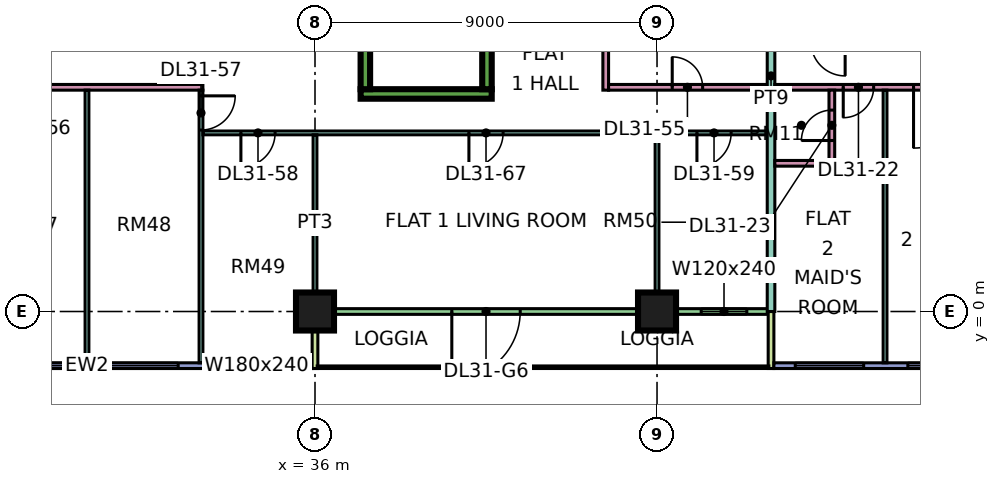
"""IFC4 building model, lengths in metres.
Left out: names, types, materials, properties, quantities, classifications, styles, units other than length and angle.
Written with IfcOpenShell. Run it as: python <this file> out.ifc"""

import sys

from ifc_helpers import new_model, si_unit, direction, frame, frame_2d, origin, origin_2d, place, context, subcontext, project, spatial, rectangle, extrude, element, fill, save


model = new_model("IFC4")
c1 = context("Model", 3, precision=1e-05, world=origin(), true_north=direction((0.0, 1.0)))
c2 = subcontext(c1, "Body", "Model", "MODEL_VIEW")
j1 = project(units=[si_unit("LENGTHUNIT", "METRE"), si_unit("PLANEANGLEUNIT", "RADIAN")], contexts=[c1])
p1 = place(None, origin())
s1 = spatial("IfcSite", under=j1, at=p1, CompositionType="ELEMENT")
p2 = place(p1, origin())
s2 = spatial("IfcBuilding", under=s1, at=p2, CompositionType="ELEMENT")
p3 = place(p2, frame((0.0, 0.0, 133.15)))
s3 = spatial("IfcBuildingStorey", under=s2, at=p3, CompositionType="ELEMENT", Elevation=133.15)
for number, where, z_axis, x_axis in (
    (1, (36.0, 0.0, 0.0), (0.0, 0.0, 1.0), (1.0, 0.0, 0.0)),
    (2, (45.0, 0.0, 0.0), (0.0, 0.0, 1.0), (1.0, 0.0, 0.0)),
):
    element("IfcColumn", number, at=place(p3, frame(where, z_axis=z_axis, x_axis=x_axis)), inside=s3, PredefinedType="COLUMN", context=c2, shape_type="SweptSolid", body=[
        extrude(rectangle(XDim=1.0, YDim=1.0, at=origin_2d()), origin(), (0.0, 0.0, 1.0), 3.75),
    ])
p4 = place(p3, frame((37.2, 5.725, 0.0), z_axis=(0.0, 0.0, 1.0), x_axis=(1.0, 0.0, 0.0)))
e3 = element("IfcWall", 3, at=p4, inside=s3, PredefinedType="SHEAR", context=c2, shape_type="SweptSolid", body=[
    extrude(rectangle(XDim=3.45, YDim=0.25, at=frame_2d((1.725, 0.0))), origin(), (0.0, 0.0, 1.0), 3.75),
])
for number, where, z_axis, x_axis in (
    (4, (37.325, 5.85, 0.0), (0.0, 0.0, 1.0), (0.0, 1.0, 0.0)),
    (5, (40.525, 5.85, 0.0), (0.0, 0.0, 1.0), (0.0, 1.0, 0.0)),
):
    element("IfcWall", number, at=place(p3, frame(where, z_axis=z_axis, x_axis=x_axis)), inside=s3, PredefinedType="SHEAR", context=c2, shape_type="SweptSolid", body=[
        extrude(rectangle(XDim=6.5, YDim=0.25, at=frame_2d((3.25, 0.0))), origin(), (0.0, 0.0, 1.0), 3.75),
    ])
p5 = place(p3, frame((24.075, -1.425, 0.0), z_axis=(0.0, 0.0, 1.0), x_axis=(1.0, 0.0, 0.0)))
e6 = element("IfcWall", 6, at=p5, inside=s3, PredefinedType="SOLIDWALL", context=c2, shape_type="SweptSolid", body=[
    extrude(rectangle(XDim=11.85, YDim=0.15, at=frame_2d((5.925, 0.0))), origin(), (0.0, 0.0, 1.0), 3.35),
])
p6 = place(p5, frame((0.562, 0.0, 0.45)))
e7 = element("IfcOpeningElement", 7, at=p6, cuts=e6, PredefinedType="OPENING", context=c2, shape_type="SweptSolid", body=[
    extrude(rectangle(XDim=1.8, YDim=2.4, at=frame_2d((0.9, 1.2))), frame((0.0, 0.085, 0.0), z_axis=(0.0, -1.0, 0.0), x_axis=(1.0, 0.0, 0.0)), (0.0, 0.0, 1.0), 0.17),
])
p7 = place(p5, frame((3.525, 0.0, 0.45)))
e8 = element("IfcOpeningElement", 8, at=p7, cuts=e6, PredefinedType="OPENING", context=c2, shape_type="SweptSolid", body=[
    extrude(rectangle(XDim=1.8, YDim=2.4, at=frame_2d((0.9, 1.2))), frame((0.0, 0.085, 0.0), z_axis=(0.0, -1.0, 0.0), x_axis=(1.0, 0.0, 0.0)), (0.0, 0.0, 1.0), 0.17),
])
p8 = place(p5, frame((6.525, 0.0, 0.45)))
e9 = element("IfcOpeningElement", 9, at=p8, cuts=e6, PredefinedType="OPENING", context=c2, shape_type="SweptSolid", body=[
    extrude(rectangle(XDim=1.8, YDim=2.4, at=frame_2d((0.9, 1.2))), frame((0.0, 0.085, 0.0), z_axis=(0.0, -1.0, 0.0), x_axis=(1.0, 0.0, 0.0)), (0.0, 0.0, 1.0), 0.17),
])
p9 = place(p5, frame((9.488, 0.0, 0.45)))
e10 = element("IfcOpeningElement", 10, at=p9, cuts=e6, PredefinedType="OPENING", context=c2, shape_type="SweptSolid", body=[
    extrude(rectangle(XDim=1.8, YDim=2.4, at=frame_2d((0.9, 1.2))), frame((0.0, 0.085, 0.0), z_axis=(0.0, -1.0, 0.0), x_axis=(1.0, 0.0, 0.0)), (0.0, 0.0, 1.0), 0.17),
])
p10 = place(p3, frame((36.075, 0.0, 0.0), z_axis=(0.0, 0.0, 1.0), x_axis=(1.0, 0.0, 0.0)))
e11 = element("IfcWall", 11, at=p10, inside=s3, PredefinedType="SOLIDWALL", context=c2, shape_type="SweptSolid", body=[
    extrude(rectangle(XDim=11.85, YDim=0.15, at=frame_2d((5.925, 0.0))), origin(), (0.0, 0.0, 1.0), 3.35),
])
p11 = place(p10, frame((3.525, 0.0, 0.0)))
e12 = element("IfcOpeningElement", 12, at=p11, cuts=e11, PredefinedType="OPENING", context=c2, shape_type="SweptSolid", body=[
    extrude(rectangle(XDim=1.8, YDim=2.4, at=frame_2d((0.9, 1.2))), frame((0.0, 0.085, 0.0), z_axis=(0.0, -1.0, 0.0), x_axis=(1.0, 0.0, 0.0)), (0.0, 0.0, 1.0), 0.17),
])
p12 = place(p10, frame((10.087, 0.0, 0.45)))
e13 = element("IfcOpeningElement", 13, at=p12, cuts=e11, PredefinedType="OPENING", context=c2, shape_type="SweptSolid", body=[
    extrude(rectangle(XDim=1.2, YDim=2.4, at=frame_2d((0.6, 1.2))), frame((0.0, 0.085, 0.0), z_axis=(0.0, -1.0, 0.0), x_axis=(1.0, 0.0, 0.0)), (0.0, 0.0, 1.0), 0.17),
])
for number, where, z_axis, x_axis in (
    (14, (36.0, -1.5, 0.0), (0.0, 0.0, 1.0), (0.0, 1.0, 0.0)),
    (15, (48.0, -1.5, 0.0), (0.0, 0.0, 1.0), (0.0, 1.0, 0.0)),
):
    element("IfcWall", number, at=place(p3, frame(where, z_axis=z_axis, x_axis=x_axis)), inside=s3, PredefinedType="SOLIDWALL", context=c2, shape_type="SweptSolid", body=[
        extrude(rectangle(XDim=1.5, YDim=0.15, at=frame_2d((0.75, 0.0))), origin(), (0.0, 0.0, 1.0), 3.35),
    ])
p13 = place(p3, frame((48.075, -1.425, 0.0), z_axis=(0.0, 0.0, 1.0), x_axis=(1.0, 0.0, 0.0)))
e16 = element("IfcWall", 16, at=p13, inside=s3, PredefinedType="SOLIDWALL", context=c2, shape_type="SweptSolid", body=[
    extrude(rectangle(XDim=11.85, YDim=0.15, at=frame_2d((5.925, 0.0))), origin(), (0.0, 0.0, 1.0), 3.35),
])
p14 = place(p13, frame((0.562, 0.0, 0.45)))
e17 = element("IfcOpeningElement", 17, at=p14, cuts=e16, PredefinedType="OPENING", context=c2, shape_type="SweptSolid", body=[
    extrude(rectangle(XDim=1.8, YDim=2.4, at=frame_2d((0.9, 1.2))), frame((0.0, 0.085, 0.0), z_axis=(0.0, -1.0, 0.0), x_axis=(1.0, 0.0, 0.0)), (0.0, 0.0, 1.0), 0.17),
])
p15 = place(p13, frame((3.525, 0.0, 0.45)))
e18 = element("IfcOpeningElement", 18, at=p15, cuts=e16, PredefinedType="OPENING", context=c2, shape_type="SweptSolid", body=[
    extrude(rectangle(XDim=1.8, YDim=2.4, at=frame_2d((0.9, 1.2))), frame((0.0, 0.085, 0.0), z_axis=(0.0, -1.0, 0.0), x_axis=(1.0, 0.0, 0.0)), (0.0, 0.0, 1.0), 0.17),
])
p16 = place(p13, frame((6.525, 0.0, 0.45)))
e19 = element("IfcOpeningElement", 19, at=p16, cuts=e16, PredefinedType="OPENING", context=c2, shape_type="SweptSolid", body=[
    extrude(rectangle(XDim=1.8, YDim=2.4, at=frame_2d((0.9, 1.2))), frame((0.0, 0.085, 0.0), z_axis=(0.0, -1.0, 0.0), x_axis=(1.0, 0.0, 0.0)), (0.0, 0.0, 1.0), 0.17),
])
p17 = place(p13, frame((9.488, 0.0, 0.45)))
e20 = element("IfcOpeningElement", 20, at=p17, cuts=e16, PredefinedType="OPENING", context=c2, shape_type="SweptSolid", body=[
    extrude(rectangle(XDim=1.8, YDim=2.4, at=frame_2d((0.9, 1.2))), frame((0.0, 0.085, 0.0), z_axis=(0.0, -1.0, 0.0), x_axis=(1.0, 0.0, 0.0)), (0.0, 0.0, 1.0), 0.17),
])
p18 = place(p3, frame((11.925, 5.9, 0.0), z_axis=(0.0, 0.0, 1.0), x_axis=(1.0, 0.0, 0.0)))
e21 = element("IfcWall", 21, at=p18, inside=s3, PredefinedType="PARTITIONING", context=c2, shape_type="SweptSolid", body=[
    extrude(rectangle(XDim=21.125, YDim=0.15, at=frame_2d((10.562, 0.0))), origin(), (0.0, 0.0, 1.0), 3.35),
])
p19 = place(p18, frame((16.125, 0.0, 0.0)))
e22 = element("IfcOpeningElement", 22, at=p19, cuts=e21, PredefinedType="OPENING", context=c2, shape_type="SweptSolid", body=[
    extrude(rectangle(XDim=0.9, YDim=2.1, at=frame_2d((0.45, 1.05))), frame((0.0, 0.085, 0.0), z_axis=(0.0, -1.0, 0.0), x_axis=(1.0, 0.0, 0.0)), (0.0, 0.0, 1.0), 0.17),
])
p20 = place(p18, frame((4.125, 0.0, 0.0)))
e23 = element("IfcOpeningElement", 23, at=p20, cuts=e21, PredefinedType="OPENING", context=c2, shape_type="SweptSolid", body=[
    extrude(rectangle(XDim=0.9, YDim=2.1, at=frame_2d((0.45, 1.05))), frame((0.0, 0.085, 0.0), z_axis=(0.0, -1.0, 0.0), x_axis=(1.0, 0.0, 0.0)), (0.0, 0.0, 1.0), 0.17),
])
p21 = place(p18, frame((10.125, 0.0, 0.0)))
e24 = element("IfcOpeningElement", 24, at=p21, cuts=e21, PredefinedType="OPENING", context=c2, shape_type="SweptSolid", body=[
    extrude(rectangle(XDim=0.9, YDim=2.1, at=frame_2d((0.45, 1.05))), frame((0.0, 0.085, 0.0), z_axis=(0.0, -1.0, 0.0), x_axis=(1.0, 0.0, 0.0)), (0.0, 0.0, 1.0), 0.17),
])
p22 = place(p3, frame((30.0, -1.351, 0.0), z_axis=(0.0, 0.0, 1.0), x_axis=(0.0, 1.0, 0.0)))
e25 = element("IfcWall", 25, at=p22, inside=s3, PredefinedType="PARTITIONING", context=c2, shape_type="SweptSolid", body=[
    extrude(rectangle(XDim=7.176, YDim=0.1, at=frame_2d((3.588, 0.0))), origin(), (0.0, 0.0, 1.0), 3.35),
])
p23 = place(p3, frame((33.0, -1.351, 0.0), z_axis=(0.0, 0.0, 1.0), x_axis=(0.0, 1.0, 0.0)))
e26 = element("IfcWall", 26, at=p23, inside=s3, PredefinedType="PARTITIONING", context=c2, shape_type="SweptSolid", body=[
    extrude(rectangle(XDim=7.176, YDim=0.1, at=frame_2d((3.588, 0.0))), origin(), (0.0, 0.0, 1.0), 3.35),
])
p24 = place(p23, frame((6.126, 0.0, 0.0)))
e27 = element("IfcOpeningElement", 27, at=p24, cuts=e26, PredefinedType="OPENING", context=c2, shape_type="SweptSolid", body=[
    extrude(rectangle(XDim=0.9, YDim=2.1, at=frame_2d((0.45, 1.05))), frame((0.0, 0.06, 0.0), z_axis=(0.0, -1.0, 0.0), x_axis=(1.0, 0.0, 0.0)), (0.0, 0.0, 1.0), 0.12),
])
p25 = place(p3, frame((33.05, 4.7, 0.0), z_axis=(0.0, 0.0, 1.0), x_axis=(1.0, 0.0, 0.0)))
e28 = element("IfcWall", 28, at=p25, inside=s3, PredefinedType="PARTITIONING", context=c2, shape_type="SweptSolid", body=[
    extrude(rectangle(XDim=14.85, YDim=0.1, at=frame_2d((7.425, 0.0))), origin(), (0.0, 0.0, 1.0), 3.35),
])
p26 = place(p25, frame((1.0, 0.0, 0.0)))
e29 = element("IfcOpeningElement", 29, at=p26, cuts=e28, PredefinedType="OPENING", context=c2, shape_type="SweptSolid", body=[
    extrude(rectangle(XDim=0.9, YDim=2.1, at=frame_2d((0.45, 1.05))), frame((0.0, 0.06, 0.0), z_axis=(0.0, -1.0, 0.0), x_axis=(1.0, 0.0, 0.0)), (0.0, 0.0, 1.0), 0.12),
])
p27 = place(p25, frame((13.0, 0.0, 0.0)))
e30 = element("IfcOpeningElement", 30, at=p27, cuts=e28, PredefinedType="OPENING", context=c2, shape_type="SweptSolid", body=[
    extrude(rectangle(XDim=0.9, YDim=2.1, at=frame_2d((0.45, 1.05))), frame((0.0, 0.06, 0.0), z_axis=(0.0, -1.0, 0.0), x_axis=(1.0, 0.0, 0.0)), (0.0, 0.0, 1.0), 0.12),
])
p28 = place(p25, frame((7.0, 0.0, 0.0)))
e31 = element("IfcOpeningElement", 31, at=p28, cuts=e28, PredefinedType="OPENING", context=c2, shape_type="SweptSolid", body=[
    extrude(rectangle(XDim=0.9, YDim=2.1, at=frame_2d((0.45, 1.05))), frame((0.0, 0.06, 0.0), z_axis=(0.0, -1.0, 0.0), x_axis=(1.0, 0.0, 0.0)), (0.0, 0.0, 1.0), 0.12),
])
p29 = place(p3, frame((36.0, 0.0, 0.0), z_axis=(0.0, 0.0, 1.0), x_axis=(0.0, 1.0, 0.0)))
e32 = element("IfcWall", 32, at=p29, inside=s3, PredefinedType="PARTITIONING", context=c2, shape_type="SweptSolid", body=[
    extrude(rectangle(XDim=4.65, YDim=0.1, at=frame_2d((2.325, 0.0))), origin(), (0.0, 0.0, 1.0), 3.35),
])
p30 = place(p3, frame((43.65, 5.825, 0.0), z_axis=(0.0, 0.0, 1.0), x_axis=(0.0, 1.0, 0.0)))
e33 = element("IfcWall", 33, at=p30, inside=s3, PredefinedType="PARTITIONING", context=c2, shape_type="SweptSolid", body=[
    extrude(rectangle(XDim=6.575, YDim=0.15, at=frame_2d((3.288, 0.0))), origin(), (0.0, 0.0, 1.0), 3.35),
])
p31 = place(p30, frame((4.425, 0.0, 0.0)))
e34 = element("IfcOpeningElement", 34, at=p31, cuts=e33, PredefinedType="OPENING", context=c2, shape_type="SweptSolid", body=[
    extrude(rectangle(XDim=0.9, YDim=2.1, at=frame_2d((0.45, 1.05))), frame((0.0, 0.085, 0.0), z_axis=(0.0, -1.0, 0.0), x_axis=(1.0, 0.0, 0.0)), (0.0, 0.0, 1.0), 0.17),
])
p32 = place(p3, frame((43.725, 5.9, 0.0), z_axis=(0.0, 0.0, 1.0), x_axis=(1.0, 0.0, 0.0)))
e35 = element("IfcWall", 35, at=p32, inside=s3, PredefinedType="PARTITIONING", context=c2, shape_type="SweptSolid", body=[
    extrude(rectangle(XDim=4.175, YDim=0.15, at=frame_2d((2.087, 0.0))), origin(), (0.0, 0.0, 1.0), 3.35),
])
p33 = place(p32, frame((1.675, 0.0, 0.0)))
e36 = element("IfcOpeningElement", 36, at=p33, cuts=e35, PredefinedType="OPENING", context=c2, shape_type="SweptSolid", body=[
    extrude(rectangle(XDim=0.8, YDim=2.1, at=frame_2d((0.4, 1.05))), frame((0.0, 0.085, 0.0), z_axis=(0.0, -1.0, 0.0), x_axis=(1.0, 0.0, 0.0)), (0.0, 0.0, 1.0), 0.17),
])
p34 = place(p3, frame((45.0, 0.074, 0.0), z_axis=(0.0, 0.0, 1.0), x_axis=(0.0, 1.0, 0.0)))
e37 = element("IfcWall", 37, at=p34, inside=s3, PredefinedType="PARTITIONING", context=c2, shape_type="SweptSolid", body=[
    extrude(rectangle(XDim=4.576, YDim=0.1, at=frame_2d((2.288, 0.0))), origin(), (0.0, 0.0, 1.0), 3.35),
])
p35 = place(p3, frame((48.0, 0.0, 0.0), z_axis=(0.0, 0.0, 1.0), x_axis=(0.0, 1.0, 0.0)))
e38 = element("IfcWall", 38, at=p35, inside=s3, PredefinedType="PARTITIONING", context=c2, shape_type="SweptSolid", body=[
    extrude(rectangle(XDim=12.4, YDim=0.2, at=frame_2d((6.2, 0.0))), origin(), (0.0, 0.0, 1.0), 3.35),
])
p36 = place(p3, frame((48.1, 3.9, 0.0), z_axis=(0.0, 0.0, 1.0), x_axis=(1.0, 0.0, 0.0)))
e39 = element("IfcWall", 39, at=p36, inside=s3, PredefinedType="PARTITIONING", context=c2, shape_type="SweptSolid", body=[
    extrude(rectangle(XDim=1.425, YDim=0.15, at=frame_2d((0.712, 0.0))), origin(), (0.0, 0.0, 1.0), 3.35),
])
p37 = place(p3, frame((48.1, 5.9, 0.0), z_axis=(0.0, 0.0, 1.0), x_axis=(1.0, 0.0, 0.0)))
e40 = element("IfcWall", 40, at=p37, inside=s3, PredefinedType="PARTITIONING", context=c2, shape_type="SweptSolid", body=[
    extrude(rectangle(XDim=25.25, YDim=0.15, at=frame_2d((12.625, 0.0))), origin(), (0.0, 0.0, 1.0), 3.35),
])
p38 = place(p37, frame((6.95, 0.0, 0.0)))
e41 = element("IfcOpeningElement", 41, at=p38, cuts=e40, PredefinedType="OPENING", context=c2, shape_type="SweptSolid", body=[
    extrude(rectangle(XDim=0.9, YDim=2.1, at=frame_2d((0.45, 1.05))), frame((0.0, 0.085, 0.0), z_axis=(0.0, -1.0, 0.0), x_axis=(1.0, 0.0, 0.0)), (0.0, 0.0, 1.0), 0.17),
])
p39 = place(p37, frame((9.95, 0.0, 0.0)))
e42 = element("IfcOpeningElement", 42, at=p39, cuts=e40, PredefinedType="OPENING", context=c2, shape_type="SweptSolid", body=[
    extrude(rectangle(XDim=0.9, YDim=2.1, at=frame_2d((0.45, 1.05))), frame((0.0, 0.085, 0.0), z_axis=(0.0, -1.0, 0.0), x_axis=(1.0, 0.0, 0.0)), (0.0, 0.0, 1.0), 0.17),
])
p40 = place(p37, frame((15.95, 0.0, 0.0)))
e43 = element("IfcOpeningElement", 43, at=p40, cuts=e40, PredefinedType="OPENING", context=c2, shape_type="SweptSolid", body=[
    extrude(rectangle(XDim=0.9, YDim=2.1, at=frame_2d((0.45, 1.05))), frame((0.0, 0.085, 0.0), z_axis=(0.0, -1.0, 0.0), x_axis=(1.0, 0.0, 0.0)), (0.0, 0.0, 1.0), 0.17),
])
p41 = place(p37, frame((20.45, 0.0, 0.0)))
e44 = element("IfcOpeningElement", 44, at=p41, cuts=e40, PredefinedType="OPENING", context=c2, shape_type="SweptSolid", body=[
    extrude(rectangle(XDim=0.9, YDim=2.1, at=frame_2d((0.45, 1.05))), frame((0.0, 0.085, 0.0), z_axis=(0.0, -1.0, 0.0), x_axis=(1.0, 0.0, 0.0)), (0.0, 0.0, 1.0), 0.17),
])
p42 = place(p37, frame((1.8, 0.0, 0.0)))
e45 = element("IfcOpeningElement", 45, at=p42, cuts=e40, PredefinedType="OPENING", context=c2, shape_type="SweptSolid", body=[
    extrude(rectangle(XDim=0.8, YDim=2.1, at=frame_2d((0.4, 1.05))), frame((0.0, 0.085, 0.0), z_axis=(0.0, -1.0, 0.0), x_axis=(1.0, 0.0, 0.0)), (0.0, 0.0, 1.0), 0.17),
])
p43 = place(p37, frame((3.65, 0.0, 0.0)))
e46 = element("IfcOpeningElement", 46, at=p43, cuts=e40, PredefinedType="OPENING", context=c2, shape_type="SweptSolid", body=[
    extrude(rectangle(XDim=1.6, YDim=2.1, at=frame_2d((0.8, 1.05))), frame((0.0, 0.085, 0.0), z_axis=(0.0, -1.0, 0.0), x_axis=(1.0, 0.0, 0.0)), (0.0, 0.0, 1.0), 0.17),
])
p44 = place(p3, frame((49.6, 3.825, 0.0), z_axis=(0.0, 0.0, 1.0), x_axis=(0.0, 1.0, 0.0)))
e47 = element("IfcWall", 47, at=p44, inside=s3, PredefinedType="PARTITIONING", context=c2, shape_type="SweptSolid", body=[
    extrude(rectangle(XDim=2.0, YDim=0.15, at=frame_2d((1.0, 0.0))), origin(), (0.0, 0.0, 1.0), 3.35),
])
p45 = place(p44, frame((0.675, 0.0, 0.0)))
e48 = element("IfcOpeningElement", 48, at=p45, cuts=e47, PredefinedType="OPENING", context=c2, shape_type="SweptSolid", body=[
    extrude(rectangle(XDim=0.8, YDim=2.1, at=frame_2d((0.4, 1.05))), frame((0.0, 0.085, 0.0), z_axis=(0.0, -1.0, 0.0), x_axis=(1.0, 0.0, 0.0)), (0.0, 0.0, 1.0), 0.17),
])
p46 = place(p3, frame((51.0, -1.351, 0.0), z_axis=(0.0, 0.0, 1.0), x_axis=(0.0, 1.0, 0.0)))
e49 = element("IfcWall", 49, at=p46, inside=s3, PredefinedType="PARTITIONING", context=c2, shape_type="SweptSolid", body=[
    extrude(rectangle(XDim=7.176, YDim=0.1, at=frame_2d((3.588, 0.0))), origin(), (0.0, 0.0, 1.0), 3.35),
])
p47 = place(p7, origin())
e50 = element("IfcWindow", 50, at=p47, inside=s3, PartitioningType="SINGLE_PANEL", PredefinedType="WINDOW", context=c2, shape_type="SweptSolid", body=[
    extrude(rectangle(XDim=1.8, YDim=2.4, at=frame_2d((0.9, 1.2))), frame((0.0, 0.03, 0.0), z_axis=(0.0, -1.0, 0.0), x_axis=(1.0, 0.0, 0.0)), (0.0, 0.0, 1.0), 0.06),
])
fill(e8, e50)
p48 = place(p8, origin())
e51 = element("IfcWindow", 51, at=p48, inside=s3, PartitioningType="SINGLE_PANEL", PredefinedType="WINDOW", context=c2, shape_type="SweptSolid", body=[
    extrude(rectangle(XDim=1.8, YDim=2.4, at=frame_2d((0.9, 1.2))), frame((0.0, 0.03, 0.0), z_axis=(0.0, -1.0, 0.0), x_axis=(1.0, 0.0, 0.0)), (0.0, 0.0, 1.0), 0.06),
])
fill(e9, e51)
p49 = place(p9, origin())
e52 = element("IfcWindow", 52, at=p49, inside=s3, PartitioningType="SINGLE_PANEL", PredefinedType="WINDOW", context=c2, shape_type="SweptSolid", body=[
    extrude(rectangle(XDim=1.8, YDim=2.4, at=frame_2d((0.9, 1.2))), frame((0.0, 0.03, 0.0), z_axis=(0.0, -1.0, 0.0), x_axis=(1.0, 0.0, 0.0)), (0.0, 0.0, 1.0), 0.06),
])
fill(e10, e52)
p50 = place(p11, frame((1.8, 0.0, 0.0), z_axis=(0.0, 0.0, 1.0), x_axis=(-1.0, 0.0, 0.0)))
e53 = element("IfcDoor", 53, at=p50, inside=s3, OperationType="DOUBLE_DOOR_SINGLE_SWING", PredefinedType="DOOR", context=c2, shape_type="SweptSolid", body=[
    extrude(rectangle(XDim=1.8, YDim=2.4, at=frame_2d((0.9, 1.2))), frame((0.0, 0.025, 0.0), z_axis=(0.0, -1.0, 0.0), x_axis=(1.0, 0.0, 0.0)), (0.0, 0.0, 1.0), 0.05),
])
fill(e12, e53)
p51 = place(p12, origin())
e54 = element("IfcWindow", 54, at=p51, inside=s3, PartitioningType="SINGLE_PANEL", PredefinedType="WINDOW", context=c2, shape_type="SweptSolid", body=[
    extrude(rectangle(XDim=1.2, YDim=2.4, at=frame_2d((0.6, 1.2))), frame((0.0, 0.03, 0.0), z_axis=(0.0, -1.0, 0.0), x_axis=(1.0, 0.0, 0.0)), (0.0, 0.0, 1.0), 0.06),
])
fill(e13, e54)
p52 = place(p14, origin())
e55 = element("IfcWindow", 55, at=p52, inside=s3, PartitioningType="SINGLE_PANEL", PredefinedType="WINDOW", context=c2, shape_type="SweptSolid", body=[
    extrude(rectangle(XDim=1.8, YDim=2.4, at=frame_2d((0.9, 1.2))), frame((0.0, 0.03, 0.0), z_axis=(0.0, -1.0, 0.0), x_axis=(1.0, 0.0, 0.0)), (0.0, 0.0, 1.0), 0.06),
])
fill(e17, e55)
p53 = place(p15, origin())
e56 = element("IfcWindow", 56, at=p53, inside=s3, PartitioningType="SINGLE_PANEL", PredefinedType="WINDOW", context=c2, shape_type="SweptSolid", body=[
    extrude(rectangle(XDim=1.8, YDim=2.4, at=frame_2d((0.9, 1.2))), frame((0.0, 0.03, 0.0), z_axis=(0.0, -1.0, 0.0), x_axis=(1.0, 0.0, 0.0)), (0.0, 0.0, 1.0), 0.06),
])
fill(e18, e56)
p54 = place(p42, frame((0.8, 0.0, 0.0), z_axis=(0.0, 0.0, 1.0), x_axis=(-1.0, 0.0, 0.0)))
e57 = element("IfcDoor", 57, at=p54, inside=s3, OperationType="SINGLE_SWING_LEFT", PredefinedType="DOOR", context=c2, shape_type="SweptSolid", body=[
    extrude(rectangle(XDim=0.8, YDim=2.1, at=frame_2d((0.4, 1.05))), frame((0.0, 0.025, 0.0), z_axis=(0.0, -1.0, 0.0), x_axis=(1.0, 0.0, 0.0)), (0.0, 0.0, 1.0), 0.05),
])
fill(e45, e57)
p55 = place(p45, origin())
e58 = element("IfcDoor", 58, at=p55, inside=s3, OperationType="SINGLE_SWING_LEFT", PredefinedType="DOOR", context=c2, shape_type="SweptSolid", body=[
    extrude(rectangle(XDim=0.8, YDim=2.1, at=frame_2d((0.4, 1.05))), frame((0.0, 0.025, 0.0), z_axis=(0.0, -1.0, 0.0), x_axis=(1.0, 0.0, 0.0)), (0.0, 0.0, 1.0), 0.05),
])
fill(e48, e58)
p56 = place(p43, frame((1.6, 0.0, 0.0), z_axis=(0.0, 0.0, 1.0), x_axis=(-1.0, 0.0, 0.0)))
e59 = element("IfcDoor", 59, at=p56, inside=s3, OperationType="DOUBLE_DOOR_SINGLE_SWING", PredefinedType="DOOR", context=c2, shape_type="SweptSolid", body=[
    extrude(rectangle(XDim=1.6, YDim=2.1, at=frame_2d((0.8, 1.05))), frame((0.0, 0.025, 0.0), z_axis=(0.0, -1.0, 0.0), x_axis=(1.0, 0.0, 0.0)), (0.0, 0.0, 1.0), 0.05),
])
fill(e46, e59)
p57 = place(p33, origin())
e60 = element("IfcDoor", 60, at=p57, inside=s3, OperationType="SINGLE_SWING_LEFT", PredefinedType="DOOR", context=c2, shape_type="SweptSolid", body=[
    extrude(rectangle(XDim=0.8, YDim=2.1, at=frame_2d((0.4, 1.05))), frame((0.0, 0.025, 0.0), z_axis=(0.0, -1.0, 0.0), x_axis=(1.0, 0.0, 0.0)), (0.0, 0.0, 1.0), 0.05),
])
fill(e36, e60)
p58 = place(p24, origin())
e61 = element("IfcDoor", 61, at=p58, inside=s3, OperationType="SINGLE_SWING_RIGHT", PredefinedType="DOOR", context=c2, shape_type="SweptSolid", body=[
    extrude(rectangle(XDim=0.9, YDim=2.1, at=frame_2d((0.45, 1.05))), frame((0.0, 0.025, 0.0), z_axis=(0.0, -1.0, 0.0), x_axis=(1.0, 0.0, 0.0)), (0.0, 0.0, 1.0), 0.05),
])
fill(e27, e61)
p59 = place(p26, frame((0.9, 0.0, 0.0), z_axis=(0.0, 0.0, 1.0), x_axis=(-1.0, 0.0, 0.0)))
e62 = element("IfcDoor", 62, at=p59, inside=s3, OperationType="SINGLE_SWING_LEFT", PredefinedType="DOOR", context=c2, shape_type="SweptSolid", body=[
    extrude(rectangle(XDim=0.9, YDim=2.1, at=frame_2d((0.45, 1.05))), frame((0.0, 0.025, 0.0), z_axis=(0.0, -1.0, 0.0), x_axis=(1.0, 0.0, 0.0)), (0.0, 0.0, 1.0), 0.05),
])
fill(e29, e62)
p60 = place(p27, frame((0.9, 0.0, 0.0), z_axis=(0.0, 0.0, 1.0), x_axis=(-1.0, 0.0, 0.0)))
e63 = element("IfcDoor", 63, at=p60, inside=s3, OperationType="SINGLE_SWING_LEFT", PredefinedType="DOOR", context=c2, shape_type="SweptSolid", body=[
    extrude(rectangle(XDim=0.9, YDim=2.1, at=frame_2d((0.45, 1.05))), frame((0.0, 0.025, 0.0), z_axis=(0.0, -1.0, 0.0), x_axis=(1.0, 0.0, 0.0)), (0.0, 0.0, 1.0), 0.05),
])
fill(e30, e63)
p61 = place(p28, frame((0.9, 0.0, 0.0), z_axis=(0.0, 0.0, 1.0), x_axis=(-1.0, 0.0, 0.0)))
e64 = element("IfcDoor", 64, at=p61, inside=s3, OperationType="SINGLE_SWING_LEFT", PredefinedType="DOOR", context=c2, shape_type="SweptSolid", body=[
    extrude(rectangle(XDim=0.9, YDim=2.1, at=frame_2d((0.45, 1.05))), frame((0.0, 0.025, 0.0), z_axis=(0.0, -1.0, 0.0), x_axis=(1.0, 0.0, 0.0)), (0.0, 0.0, 1.0), 0.05),
])
fill(e31, e64)
save(model, sys.argv[1])
